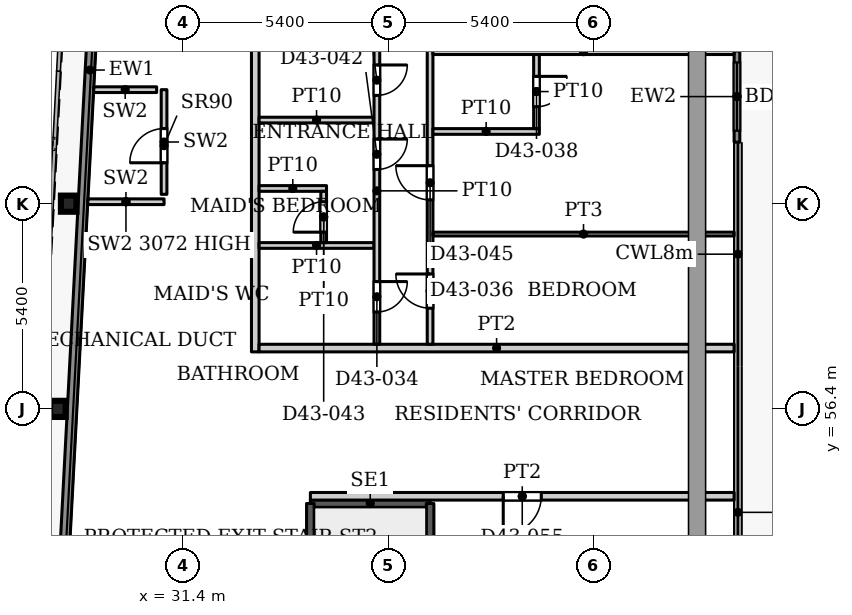
"""IFC4 building model, lengths in metres.
Left out: names, types, materials, properties, quantities, classifications, styles, units other than length and angle.
Written with IfcOpenShell. Run it as: python <this file> out.ifc"""

import sys

from ifc_helpers import new_model, si_unit, direction, frame, frame_2d, origin, origin_2d, place, context, subcontext, project, spatial, rectangle, i_section, extrude, source, transform, mapped, element, fill, save


model = new_model("IFC4")
c1 = context("Model", 3, precision=1e-05, world=origin(), true_north=direction((0.0, 1.0)))
c2 = subcontext(c1, "Body", "Model", "MODEL_VIEW")
j1 = project(units=[si_unit("LENGTHUNIT", "METRE"), si_unit("PLANEANGLEUNIT", "RADIAN")], contexts=[c1])
p1 = place(None, origin())
s1 = spatial("IfcSite", under=j1, at=p1, CompositionType="ELEMENT")
p2 = place(p1, origin())
s2 = spatial("IfcBuilding", under=s1, at=p2, CompositionType="ELEMENT")
p3 = place(p2, frame((0.0, 0.0, 183.8)))
s3 = spatial("IfcBuildingStorey", under=s2, at=p3, CompositionType="ELEMENT", Elevation=183.8)
for number, where, z_axis, x_axis in (
    (1, (28.106, 56.4, 0.0), (0.0, 0.0, 1.0), (1.0, 0.0, 0.0)),
    (2, (28.39, 61.8, 0.0), (0.0, 0.0, 1.0), (1.0, 0.0, 0.0)),
):
    element("IfcColumn", number, at=place(p3, frame(where, z_axis=z_axis, x_axis=x_axis)), inside=s3, PredefinedType="COLUMN", context=c2, shape_type="SweptSolid", body=[
        extrude(i_section(OverallWidth=0.409, OverallDepth=0.425, WebThickness=0.033, FlangeThickness=0.052, FilletRadius=0.013, at=origin_2d()), origin(), (0.0, 0.0, 1.0), 3.9),
    ])
p4 = place(p3, frame((27.195, 31.969, 0.0), z_axis=(0.0, 0.0, 1.0), x_axis=(0.052554995867, 0.998618031286, 0.0)))
e3 = element("IfcWall", 3, at=p4, inside=s3, PredefinedType="SOLIDWALL", context=c2, shape_type="SweptSolid", body=[
    extrude(rectangle(XDim=66.787, YDim=0.25, at=frame_2d((33.394, 0.0))), origin(), (0.0, 0.0, 1.0), 3.75),
])
p5 = place(p3, frame((45.975, 65.818, 0.0), z_axis=(0.0, 0.0, 1.0), x_axis=(0.0, -1.0, 0.0)))
e4 = element("IfcWall", 4, at=p5, inside=s3, PredefinedType="SOLIDWALL", context=c2, shape_type="SweptSolid", body=[
    extrude(rectangle(XDim=2.4, YDim=0.15, at=frame_2d((1.2, 0.0))), origin(), (0.0, 0.0, 1.0), 3.75),
])
p6 = place(p5, frame((0.3, 0.0, 0.0)))
e5 = element("IfcOpeningElement", 5, at=p6, cuts=e4, PredefinedType="OPENING", context=c2, shape_type="SweptSolid", body=[
    extrude(rectangle(XDim=1.8, YDim=2.4, at=frame_2d((0.9, 1.2))), frame((0.0, 0.085, 0.0), z_axis=(0.0, -1.0, 0.0), x_axis=(1.0, 0.0, 0.0)), (0.0, 0.0, 1.0), 0.17),
])
p7 = place(p3, frame((34.75, 53.91, 0.0), z_axis=(0.0, 0.0, 1.0), x_axis=(1.0, 0.0, 0.0)))
e6 = element("IfcWall", 6, at=p7, inside=s3, PredefinedType="SHEAR", context=c2, shape_type="SweptSolid", body=[
    extrude(rectangle(XDim=3.15, YDim=0.2, at=frame_2d((1.575, 0.0))), origin(), (0.0, 0.0, 1.0), 3.9),
])
p8 = place(p3, frame((34.75, 47.5, 0.0), z_axis=(0.0, 0.0, 1.0), x_axis=(0.0, 1.0, 0.0)))
e7 = element("IfcWall", 7, at=p8, inside=s3, PredefinedType="SHEAR", context=c2, shape_type="SweptSolid", body=[
    extrude(rectangle(XDim=6.41, YDim=0.2, at=frame_2d((3.205, 0.0))), origin(), (0.0, 0.0, 1.0), 3.9),
])
p9 = place(p3, frame((37.9, 44.75, 0.0), z_axis=(0.0, 0.0, 1.0), x_axis=(0.0, 1.0, 0.0)))
e8 = element("IfcWall", 8, at=p9, inside=s3, PredefinedType="SHEAR", context=c2, shape_type="SweptSolid", body=[
    extrude(rectangle(XDim=9.16, YDim=0.2, at=frame_2d((4.58, 0.0))), origin(), (0.0, 0.0, 1.0), 3.9),
])
p10 = place(p3, frame((28.895, 61.851, 0.0), z_axis=(0.0, 0.0, 1.0), x_axis=(1.0, 0.0, 0.0)))
e9 = element("IfcWall", 9, at=p10, inside=s3, PredefinedType="PARTITIONING", context=c2, shape_type="SweptSolid", body=[
    extrude(rectangle(XDim=2.005, YDim=0.15, at=frame_2d((1.002, 0.0))), origin(), (0.0, 0.0, 1.0), 3.072),
])
p11 = place(p3, frame((30.9, 62.046, 0.0), z_axis=(0.0, 0.0, 1.0), x_axis=(0.0, 1.0, 0.0)))
e10 = element("IfcWall", 10, at=p11, inside=s3, PredefinedType="PARTITIONING", context=c2, shape_type="SweptSolid", body=[
    extrude(rectangle(XDim=2.754, YDim=0.15, at=frame_2d((1.377, 0.0))), origin(), (0.0, 0.0, 1.0), 3.9),
])
p12 = place(p11, frame((0.83, 0.0, 0.0)))
e11 = element("IfcOpeningElement", 11, at=p12, cuts=e10, PredefinedType="OPENING", context=c2, shape_type="SweptSolid", body=[
    extrude(rectangle(XDim=0.9, YDim=2.2, at=frame_2d((0.45, 1.1))), frame((0.0, 0.085, 0.0), z_axis=(0.0, -1.0, 0.0), x_axis=(1.0, 0.0, 0.0)), (0.0, 0.0, 1.0), 0.17),
])
p13 = place(p3, frame((29.05, 64.8, 0.0), z_axis=(0.0, 0.0, 1.0), x_axis=(1.0, 0.0, 0.0)))
e12 = element("IfcWall", 12, at=p13, inside=s3, PredefinedType="PARTITIONING", context=c2, shape_type="SweptSolid", body=[
    extrude(rectangle(XDim=1.655, YDim=0.15, at=frame_2d((0.828, 0.0))), origin(), (0.0, 0.0, 1.0), 3.9),
])
p14 = place(p3, frame((33.3, 57.9, 0.0), z_axis=(0.0, 0.0, 1.0), x_axis=(0.0, 1.0, 0.0)))
e13 = element("IfcWall", 13, at=p14, inside=s3, PredefinedType="PARTITIONING", context=c2, shape_type="SweptSolid", body=[
    extrude(rectangle(XDim=17.6, YDim=0.2, at=frame_2d((8.8, 0.0))), origin(), (0.0, 0.0, 1.0), 3.6),
])
p15 = place(p14, frame((8.9, 0.0, 0.0)))
e14 = element("IfcOpeningElement", 14, at=p15, cuts=e13, PredefinedType="OPENING", context=c2, shape_type="SweptSolid", body=[
    extrude(rectangle(XDim=1.0, YDim=2.1, at=frame_2d((0.5, 1.05))), frame((0.0, 0.11, 0.0), z_axis=(0.0, -1.0, 0.0), x_axis=(1.0, 0.0, 0.0)), (0.0, 0.0, 1.0), 0.22),
])
p16 = place(p3, frame((33.4, 58.0, 0.0), z_axis=(0.0, 0.0, 1.0), x_axis=(1.0, 0.0, 0.0)))
e15 = element("IfcWall", 15, at=p16, inside=s3, PredefinedType="PARTITIONING", context=c2, shape_type="SweptSolid", body=[
    extrude(rectangle(XDim=12.5, YDim=0.2, at=frame_2d((6.25, 0.0))), origin(), (0.0, 0.0, 1.0), 3.6),
])
p17 = place(p3, frame((33.4, 60.7, 0.0), z_axis=(0.0, 0.0, 1.0), x_axis=(1.0, 0.0, 0.0)))
e16 = element("IfcWall", 16, at=p17, inside=s3, PredefinedType="PARTITIONING", context=c2, shape_type="SweptSolid", body=[
    extrude(rectangle(XDim=3.025, YDim=0.15, at=frame_2d((1.513, 0.0))), origin(), (0.0, 0.0, 1.0), 3.6),
])
p18 = place(p3, frame((33.4, 62.2, 0.0), z_axis=(0.0, 0.0, 1.0), x_axis=(1.0, 0.0, 0.0)))
e17 = element("IfcWall", 17, at=p18, inside=s3, PredefinedType="PARTITIONING", context=c2, shape_type="SweptSolid", body=[
    extrude(rectangle(XDim=1.775, YDim=0.15, at=frame_2d((0.888, 0.0))), origin(), (0.0, 0.0, 1.0), 3.6),
])
p19 = place(p3, frame((33.4, 64.0, 0.0), z_axis=(0.0, 0.0, 1.0), x_axis=(1.0, 0.0, 0.0)))
e18 = element("IfcWall", 18, at=p19, inside=s3, PredefinedType="PARTITIONING", context=c2, shape_type="SweptSolid", body=[
    extrude(rectangle(XDim=3.025, YDim=0.15, at=frame_2d((1.513, 0.0))), origin(), (0.0, 0.0, 1.0), 3.6),
])
p20 = place(p3, frame((34.75, 54.1, 0.0), z_axis=(0.0, 0.0, 1.0), x_axis=(1.0, 0.0, 0.0)))
e19 = element("IfcWall", 19, at=p20, inside=s3, PredefinedType="PARTITIONING", context=c2, shape_type="SweptSolid", body=[
    extrude(rectangle(XDim=11.15, YDim=0.2, at=frame_2d((5.575, 0.0))), origin(), (0.0, 0.0, 1.0), 3.6),
])
p21 = place(p20, frame((5.075, 0.0, 0.0)))
e20 = element("IfcOpeningElement", 20, at=p21, cuts=e19, PredefinedType="OPENING", context=c2, shape_type="SweptSolid", body=[
    extrude(rectangle(XDim=1.0, YDim=2.1, at=frame_2d((0.5, 1.05))), frame((0.0, 0.11, 0.0), z_axis=(0.0, -1.0, 0.0), x_axis=(1.0, 0.0, 0.0)), (0.0, 0.0, 1.0), 0.22),
])
p22 = place(p3, frame((35.1, 60.775, 0.0), z_axis=(0.0, 0.0, 1.0), x_axis=(0.0, 1.0, 0.0)))
e21 = element("IfcWall", 21, at=p22, inside=s3, PredefinedType="PARTITIONING", context=c2, shape_type="SweptSolid", body=[
    extrude(rectangle(XDim=1.35, YDim=0.15, at=frame_2d((0.675, 0.0))), origin(), (0.0, 0.0, 1.0), 3.6),
])
p23 = place(p22, frame((0.275, 0.0, 0.0)))
e22 = element("IfcOpeningElement", 22, at=p23, cuts=e21, PredefinedType="OPENING", context=c2, shape_type="SweptSolid", body=[
    extrude(rectangle(XDim=0.8, YDim=2.1, at=frame_2d((0.4, 1.05))), frame((0.0, 0.085, 0.0), z_axis=(0.0, -1.0, 0.0), x_axis=(1.0, 0.0, 0.0)), (0.0, 0.0, 1.0), 0.17),
])
p24 = place(p3, frame((36.5, 58.1, 0.0), z_axis=(0.0, 0.0, 1.0), x_axis=(0.0, 1.0, 0.0)))
e23 = element("IfcWall", 23, at=p24, inside=s3, PredefinedType="PARTITIONING", context=c2, shape_type="SweptSolid", body=[
    extrude(rectangle(XDim=8.075, YDim=0.15, at=frame_2d((4.038, 0.0))), origin(), (0.0, 0.0, 1.0), 3.6),
])
p25 = place(p24, frame((0.85, 0.0, 0.0)))
e24 = element("IfcOpeningElement", 24, at=p25, cuts=e23, PredefinedType="OPENING", context=c2, shape_type="SweptSolid", body=[
    extrude(rectangle(XDim=0.8, YDim=2.1, at=frame_2d((0.4, 1.05))), frame((0.0, 0.085, 0.0), z_axis=(0.0, -1.0, 0.0), x_axis=(1.0, 0.0, 0.0)), (0.0, 0.0, 1.0), 0.17),
])
p26 = place(p24, frame((4.6, 0.0, 0.0)))
e25 = element("IfcOpeningElement", 25, at=p26, cuts=e23, PredefinedType="OPENING", context=c2, shape_type="SweptSolid", body=[
    extrude(rectangle(XDim=0.8, YDim=2.1, at=frame_2d((0.4, 1.05))), frame((0.0, 0.085, 0.0), z_axis=(0.0, -1.0, 0.0), x_axis=(1.0, 0.0, 0.0)), (0.0, 0.0, 1.0), 0.17),
])
p27 = place(p24, frame((6.55, 0.0, 0.0)))
e26 = element("IfcOpeningElement", 26, at=p27, cuts=e23, PredefinedType="OPENING", context=c2, shape_type="SweptSolid", body=[
    extrude(rectangle(XDim=0.8, YDim=2.1, at=frame_2d((0.4, 1.05))), frame((0.0, 0.085, 0.0), z_axis=(0.0, -1.0, 0.0), x_axis=(1.0, 0.0, 0.0)), (0.0, 0.0, 1.0), 0.17),
])
p28 = place(p3, frame((37.9, 58.1, 0.0), z_axis=(0.0, 0.0, 1.0), x_axis=(0.0, 1.0, 0.0)))
e27 = element("IfcWall", 27, at=p28, inside=s3, PredefinedType="PARTITIONING", context=c2, shape_type="SweptSolid", body=[
    extrude(rectangle(XDim=17.2, YDim=0.15, at=frame_2d((8.6, 0.0))), origin(), (0.0, 0.0, 1.0), 3.6),
])
p29 = place(p28, frame((0.95, 0.0, 0.0)))
e28 = element("IfcOpeningElement", 28, at=p29, cuts=e27, PredefinedType="OPENING", context=c2, shape_type="SweptSolid", body=[
    extrude(rectangle(XDim=0.9, YDim=2.1, at=frame_2d((0.45, 1.05))), frame((0.0, 0.085, 0.0), z_axis=(0.0, -1.0, 0.0), x_axis=(1.0, 0.0, 0.0)), (0.0, 0.0, 1.0), 0.17),
])
p30 = place(p28, frame((15.2, 0.0, 0.0)))
e29 = element("IfcOpeningElement", 29, at=p30, cuts=e27, PredefinedType="OPENING", context=c2, shape_type="SweptSolid", body=[
    extrude(rectangle(XDim=0.9, YDim=2.1, at=frame_2d((0.45, 1.05))), frame((0.0, 0.085, 0.0), z_axis=(0.0, -1.0, 0.0), x_axis=(1.0, 0.0, 0.0)), (0.0, 0.0, 1.0), 0.17),
])
p31 = place(p28, frame((9.0, 0.0, 0.0)))
e30 = element("IfcOpeningElement", 30, at=p31, cuts=e27, PredefinedType="OPENING", context=c2, shape_type="SweptSolid", body=[
    extrude(rectangle(XDim=1.0, YDim=2.1, at=frame_2d((0.5, 1.05))), frame((0.0, 0.085, 0.0), z_axis=(0.0, -1.0, 0.0), x_axis=(1.0, 0.0, 0.0)), (0.0, 0.0, 1.0), 0.17),
])
p32 = place(p28, frame((12.2, 0.0, 0.0)))
e31 = element("IfcOpeningElement", 31, at=p32, cuts=e27, PredefinedType="OPENING", context=c2, shape_type="SweptSolid", body=[
    extrude(rectangle(XDim=0.9, YDim=2.1, at=frame_2d((0.45, 1.05))), frame((0.0, 0.085, 0.0), z_axis=(0.0, -1.0, 0.0), x_axis=(1.0, 0.0, 0.0)), (0.0, 0.0, 1.0), 0.17),
])
p33 = place(p28, frame((3.8, 0.0, 0.0)))
e32 = element("IfcOpeningElement", 32, at=p33, cuts=e27, PredefinedType="OPENING", context=c2, shape_type="SweptSolid", body=[
    extrude(rectangle(XDim=0.9, YDim=2.1, at=frame_2d((0.45, 1.05))), frame((0.0, 0.085, 0.0), z_axis=(0.0, -1.0, 0.0), x_axis=(1.0, 0.0, 0.0)), (0.0, 0.0, 1.0), 0.17),
])
p34 = place(p3, frame((37.975, 61.0, 0.0), z_axis=(0.0, 0.0, 1.0), x_axis=(1.0, 0.0, 0.0)))
e33 = element("IfcWall", 33, at=p34, inside=s3, PredefinedType="PARTITIONING", context=c2, shape_type="SweptSolid", body=[
    extrude(rectangle(XDim=7.925, YDim=0.1, at=frame_2d((3.962, 0.0))), origin(), (0.0, 0.0, 1.0), 3.6),
])
p35 = place(p3, frame((37.975, 63.7, 0.0), z_axis=(0.0, 0.0, 1.0), x_axis=(1.0, 0.0, 0.0)))
e34 = element("IfcWall", 34, at=p35, inside=s3, PredefinedType="PARTITIONING", context=c2, shape_type="SweptSolid", body=[
    extrude(rectangle(XDim=2.8, YDim=0.15, at=frame_2d((1.4, 0.0))), origin(), (0.0, 0.0, 1.0), 3.6),
])
p36 = place(p3, frame((37.975, 65.8, 0.0), z_axis=(0.0, 0.0, 1.0), x_axis=(1.0, 0.0, 0.0)))
e35 = element("IfcWall", 35, at=p36, inside=s3, PredefinedType="PARTITIONING", context=c2, shape_type="SweptSolid", body=[
    extrude(rectangle(XDim=7.925, YDim=0.15, at=frame_2d((3.962, 0.0))), origin(), (0.0, 0.0, 1.0), 3.6),
])
p37 = place(p3, frame((40.7, 63.775, 0.0), z_axis=(0.0, 0.0, 1.0), x_axis=(0.0, 1.0, 0.0)))
e36 = element("IfcWall", 36, at=p37, inside=s3, PredefinedType="PARTITIONING", context=c2, shape_type="SweptSolid", body=[
    extrude(rectangle(XDim=1.95, YDim=0.15, at=frame_2d((0.975, 0.0))), origin(), (0.0, 0.0, 1.0), 3.6),
])
p38 = place(p37, frame((0.575, 0.0, 0.0)))
e37 = element("IfcOpeningElement", 37, at=p38, cuts=e36, PredefinedType="OPENING", context=c2, shape_type="SweptSolid", body=[
    extrude(rectangle(XDim=0.8, YDim=2.1, at=frame_2d((0.4, 1.05))), frame((0.0, 0.085, 0.0), z_axis=(0.0, -1.0, 0.0), x_axis=(1.0, 0.0, 0.0)), (0.0, 0.0, 1.0), 0.17),
])
m1 = source(origin(), c2, "Body", "SweptSolid", [
    extrude(rectangle(XDim=1.8, YDim=2.4, at=frame_2d((0.9, 1.2))), frame((0.0, 0.025, 0.0), z_axis=(0.0, -1.0, 0.0), x_axis=(1.0, 0.0, 0.0)), (0.0, 0.0, 1.0), 0.05),
])
p39 = place(p6, origin())
e38 = element("IfcDoor", 38, at=p39, inside=s3, OperationType="SLIDING_TO_LEFT", PredefinedType="DOOR", context=c2, shape_type="MappedRepresentation", body=[
    mapped(m1, transform((0.0, 0.0, 0.0), x_axis=(1.0, 0.0, 0.0), y_axis=(0.0, 1.0, 0.0), z_axis=(0.0, 0.0, 1.0), scale=1.0)),
])
fill(e5, e38)
m2 = source(origin(), c2, "Body", "SweptSolid", [
    extrude(rectangle(XDim=0.9, YDim=2.2, at=frame_2d((0.45, 1.1))), frame((0.0, 0.025, 0.0), z_axis=(0.0, -1.0, 0.0), x_axis=(1.0, 0.0, 0.0)), (0.0, 0.0, 1.0), 0.05),
])
p40 = place(p12, origin())
e39 = element("IfcDoor", 39, at=p40, inside=s3, OperationType="SINGLE_SWING_LEFT", PredefinedType="DOOR", context=c2, shape_type="MappedRepresentation", body=[
    mapped(m2, transform((0.0, 0.0, 0.0), x_axis=(1.0, 0.0, 0.0), y_axis=(0.0, 1.0, 0.0), z_axis=(0.0, 0.0, 1.0), scale=1.0)),
])
fill(e11, e39)
m3 = source(origin(), c2, "Body", "SweptSolid", [
    extrude(rectangle(XDim=0.8, YDim=2.1, at=frame_2d((0.4, 1.05))), frame((0.0, 0.025, 0.0), z_axis=(0.0, -1.0, 0.0), x_axis=(1.0, 0.0, 0.0)), (0.0, 0.0, 1.0), 0.05),
])
p41 = place(p25, origin())
e40 = element("IfcDoor", 40, at=p41, inside=s3, OperationType="SINGLE_SWING_RIGHT", PredefinedType="DOOR", context=c2, shape_type="MappedRepresentation", body=[
    mapped(m3, transform((0.0, 0.0, 0.0), x_axis=(1.0, 0.0, 0.0), y_axis=(0.0, 1.0, 0.0), z_axis=(0.0, 0.0, 1.0), scale=1.0)),
])
fill(e24, e40)
m4 = source(origin(), c2, "Body", "SweptSolid", [
    extrude(rectangle(XDim=0.9, YDim=2.1, at=frame_2d((0.45, 1.05))), frame((0.0, 0.025, 0.0), z_axis=(0.0, -1.0, 0.0), x_axis=(1.0, 0.0, 0.0)), (0.0, 0.0, 1.0), 0.05),
])
p42 = place(p29, origin())
e41 = element("IfcDoor", 41, at=p42, inside=s3, OperationType="SINGLE_SWING_LEFT", PredefinedType="DOOR", context=c2, shape_type="MappedRepresentation", body=[
    mapped(m4, transform((0.0, 0.0, 0.0), x_axis=(1.0, 0.0, 0.0), y_axis=(0.0, 1.0, 0.0), z_axis=(0.0, 0.0, 1.0), scale=1.0)),
])
fill(e28, e41)
p43 = place(p38, origin())
e42 = element("IfcDoor", 42, at=p43, inside=s3, OperationType="SINGLE_SWING_RIGHT", PredefinedType="DOOR", context=c2, shape_type="MappedRepresentation", body=[
    mapped(m3, transform((0.0, 0.0, 0.0), x_axis=(1.0, 0.0, 0.0), y_axis=(0.0, 1.0, 0.0), z_axis=(0.0, 0.0, 1.0), scale=1.0)),
])
fill(e37, e42)
p44 = place(p26, origin())
e43 = element("IfcDoor", 43, at=p44, inside=s3, OperationType="SINGLE_SWING_RIGHT", PredefinedType="DOOR", context=c2, shape_type="MappedRepresentation", body=[
    mapped(m3, transform((0.0, 0.0, 0.0), x_axis=(1.0, 0.0, 0.0), y_axis=(0.0, 1.0, 0.0), z_axis=(0.0, 0.0, 1.0), scale=1.0)),
])
fill(e25, e43)
p45 = place(p23, origin())
e44 = element("IfcDoor", 44, at=p45, inside=s3, OperationType="SINGLE_SWING_LEFT", PredefinedType="DOOR", context=c2, shape_type="MappedRepresentation", body=[
    mapped(m3, transform((0.0, 0.0, 0.0), x_axis=(1.0, 0.0, 0.0), y_axis=(0.0, 1.0, 0.0), z_axis=(0.0, 0.0, 1.0), scale=1.0)),
])
fill(e22, e44)
p46 = place(p33, origin())
e45 = element("IfcDoor", 45, at=p46, inside=s3, OperationType="SINGLE_SWING_LEFT", PredefinedType="DOOR", context=c2, shape_type="MappedRepresentation", body=[
    mapped(m4, transform((0.0, 0.0, 0.0), x_axis=(1.0, 0.0, 0.0), y_axis=(0.0, 1.0, 0.0), z_axis=(0.0, 0.0, 1.0), scale=1.0)),
])
fill(e32, e45)
p47 = place(p27, origin())
e46 = element("IfcDoor", 46, at=p47, inside=s3, OperationType="SINGLE_SWING_RIGHT", PredefinedType="DOOR", context=c2, shape_type="MappedRepresentation", body=[
    mapped(m3, transform((0.0, 0.0, 0.0), x_axis=(1.0, 0.0, 0.0), y_axis=(0.0, 1.0, 0.0), z_axis=(0.0, 0.0, 1.0), scale=1.0)),
])
fill(e26, e46)
m5 = source(origin(), c2, "Body", "SweptSolid", [
    extrude(rectangle(XDim=1.0, YDim=2.1, at=frame_2d((0.5, 1.05))), frame((0.0, 0.025, 0.0), z_axis=(0.0, -1.0, 0.0), x_axis=(1.0, 0.0, 0.0)), (0.0, 0.0, 1.0), 0.05),
])
p48 = place(p21, origin())
e47 = element("IfcDoor", 47, at=p48, inside=s3, OperationType="SINGLE_SWING_RIGHT", PredefinedType="DOOR", context=c2, shape_type="MappedRepresentation", body=[
    mapped(m5, transform((0.0, 0.0, 0.0), x_axis=(1.0, 0.0, 0.0), y_axis=(0.0, 1.0, 0.0), z_axis=(0.0, 0.0, 1.0), scale=1.0)),
])
fill(e20, e47)
save(model, sys.argv[1])
